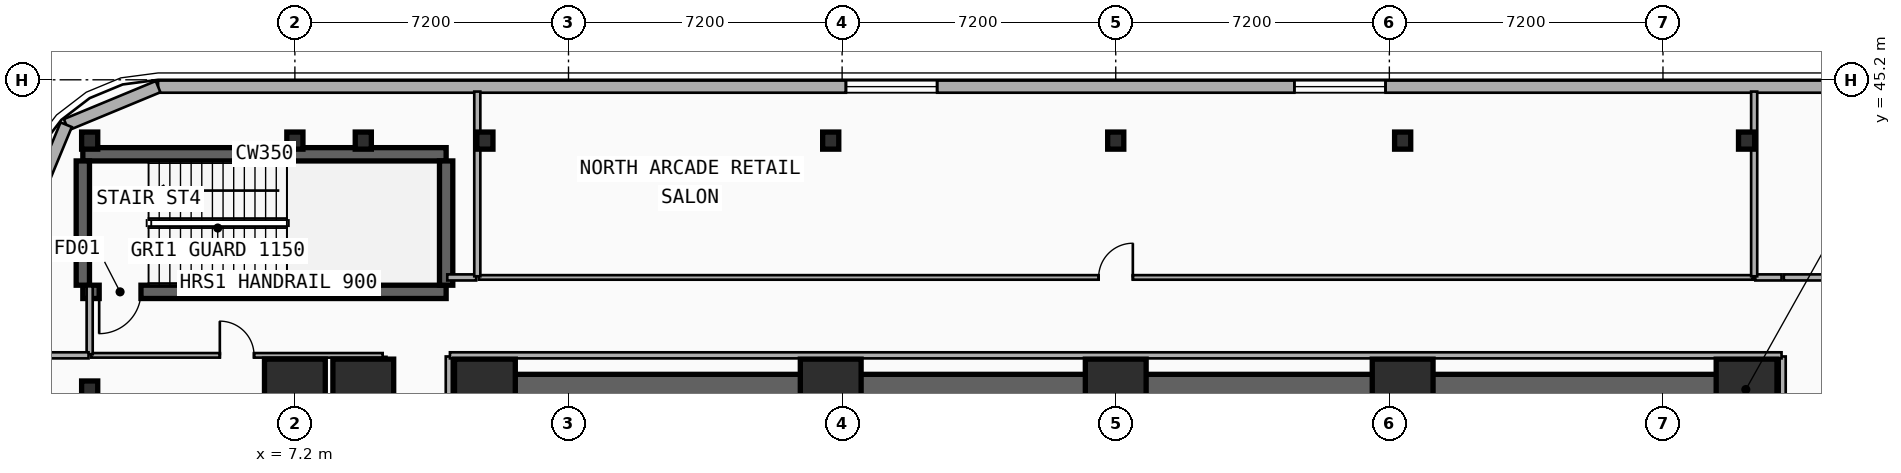
"""IFC4 building model, lengths in metres.
Left out: names, types, materials, properties, quantities, classifications, styles, units other than length and angle.
Written with IfcOpenShell. Run it as: python <this file> out.ifc"""

import sys

from ifc_helpers import new_model, si_unit, direction, frame, frame_2d, origin, origin_2d, place, context, subcontext, project, spatial, rectangle, i_section, extrude, element, fill, save


model = new_model("IFC4")
c1 = context("Model", 3, precision=1e-05, world=origin(), true_north=direction((0.0, 1.0)))
c2 = subcontext(c1, "Body", "Model", "MODEL_VIEW")
j1 = project(units=[si_unit("LENGTHUNIT", "METRE"), si_unit("PLANEANGLEUNIT", "RADIAN")], contexts=[c1])
p1 = place(None, origin())
s1 = spatial("IfcSite", under=j1, at=p1, CompositionType="ELEMENT")
p2 = place(p1, origin())
s2 = spatial("IfcBuilding", under=s1, at=p2, CompositionType="ELEMENT")
p3 = place(p2, frame((0.0, 0.0, 5.4)))
s3 = spatial("IfcBuildingStorey", under=s2, at=p3, CompositionType="ELEMENT", Elevation=5.4)
p4 = place(p3, frame((12.15, 37.05, 0.0), z_axis=(0.0, 0.0, 1.0), x_axis=(1.0, 0.0, 0.0)))
e1 = element("IfcWall", 1, at=p4, inside=s3, PredefinedType="SHEAR", context=c2, shape_type="SweptSolid", body=[
    extrude(rectangle(XDim=33.23, YDim=0.8, at=frame_2d((16.615, 0.0))), origin(), (0.0, 0.0, 1.0), 5.0),
])
p5 = place(p3, frame((1.62, 43.24, 0.0), z_axis=(0.0, 0.0, 1.0), x_axis=(1.0, 0.0, 0.0)))
e2 = element("IfcWall", 2, at=p5, inside=s3, PredefinedType="SHEAR", context=c2, shape_type="SweptSolid", body=[
    extrude(rectangle(XDim=9.56, YDim=0.35, at=frame_2d((4.78, 0.0))), origin(), (0.0, 0.0, 1.0), 5.0),
])
p6 = place(p3, frame((11.18, 39.62, 0.0), z_axis=(0.0, 0.0, 1.0), x_axis=(-1.0, 0.0, 0.0)))
e3 = element("IfcWall", 3, at=p6, inside=s3, PredefinedType="SHEAR", context=c2, shape_type="SweptSolid", body=[
    extrude(rectangle(XDim=9.56, YDim=0.35, at=frame_2d((4.78, 0.0))), origin(), (0.0, 0.0, 1.0), 5.0),
])
p7 = place(p6, frame((8.03, 0.0, 0.0)))
e4 = element("IfcOpeningElement", 4, at=p7, cuts=e3, PredefinedType="OPENING", context=c2, shape_type="SweptSolid", body=[
    extrude(rectangle(XDim=1.1, YDim=2.15, at=frame_2d((0.55, 1.075))), frame((0.0, 0.185, 0.0), z_axis=(0.0, -1.0, 0.0), x_axis=(1.0, 0.0, 0.0)), (0.0, 0.0, 1.0), 0.37),
])
for number, where, z_axis, x_axis in (
    (5, (1.62, 39.795, 0.0), (0.0, 0.0, 1.0), (0.0, 1.0, 0.0)),
    (6, (11.18, 39.795, 0.0), (0.0, 0.0, 1.0), (0.0, 1.0, 0.0)),
):
    element("IfcWall", number, at=place(p3, frame(where, z_axis=z_axis, x_axis=x_axis)), inside=s3, PredefinedType="SHEAR", context=c2, shape_type="SweptSolid", body=[
        extrude(rectangle(XDim=3.27, YDim=0.35, at=frame_2d((1.635, 0.0))), origin(), (0.0, 0.0, 1.0), 5.0),
    ])
for number, where, z_axis, x_axis in (
    (7, (12.2, 37.05, 0.0), (0.0, 0.0, 1.0), (1.0, 0.0, 0.0)),
    (8, (21.3, 37.05, 0.0), (0.0, 0.0, 1.0), (1.0, 0.0, 0.0)),
    (9, (28.8, 37.05, 0.0), (0.0, 0.0, 1.0), (1.0, 0.0, 0.0)),
    (10, (36.35, 37.05, 0.0), (0.0, 0.0, 1.0), (1.0, 0.0, 0.0)),
    (11, (45.4, 37.05, 0.0), (0.0, 0.0, 1.0), (1.0, 0.0, 0.0)),
):
    element("IfcColumn", number, at=place(p3, frame(where, z_axis=z_axis, x_axis=x_axis)), inside=s3, PredefinedType="COLUMN", context=c2, shape_type="SweptSolid", body=[
        extrude(rectangle(XDim=1.6, YDim=1.6, at=origin_2d()), origin(), (0.0, 0.0, 1.0), 5.0),
    ])
for number, where, z_axis, x_axis in (
    (12, (1.8, 37.05, 0.0), (0.0, 0.0, 1.0), (1.0, 0.0, 0.0)),
    (13, (1.8, 43.6, 0.0), (0.0, 0.0, 1.0), (1.0, 0.0, 0.0)),
):
    element("IfcColumn", number, at=place(p3, frame(where, z_axis=z_axis, x_axis=x_axis)), inside=s3, PredefinedType="COLUMN", context=c2, shape_type="SweptSolid", body=[
        extrude(i_section(OverallWidth=0.424, OverallDepth=0.45, WebThickness=0.041, FlangeThickness=0.065, FilletRadius=0.015, at=origin_2d()), origin(), (0.0, 0.0, 1.0), 5.0),
    ])
p8 = place(p3, frame((7.2, 37.05, 0.0), z_axis=(0.0, 0.0, 1.0), x_axis=(1.0, 0.0, 0.0)))
e14 = element("IfcColumn", 14, at=p8, inside=s3, PredefinedType="COLUMN", context=c2, shape_type="SweptSolid", body=[
    extrude(rectangle(XDim=1.6, YDim=1.6, at=origin_2d()), origin(), (0.0, 0.0, 1.0), 5.0),
])
p9 = place(p3, frame((7.2, 43.6, 0.0), z_axis=(0.0, 0.0, 1.0), x_axis=(1.0, 0.0, 0.0)))
e15 = element("IfcColumn", 15, at=p9, inside=s3, PredefinedType="COLUMN", context=c2, shape_type="SweptSolid", body=[
    extrude(i_section(OverallWidth=0.424, OverallDepth=0.45, WebThickness=0.041, FlangeThickness=0.065, FilletRadius=0.015, at=origin_2d()), origin(), (0.0, 0.0, 1.0), 5.0),
])
p10 = place(p3, frame((9.0, 37.05, 0.0), z_axis=(0.0, 0.0, 1.0), x_axis=(1.0, 0.0, 0.0)))
e16 = element("IfcColumn", 16, at=p10, inside=s3, PredefinedType="COLUMN", context=c2, shape_type="SweptSolid", body=[
    extrude(rectangle(XDim=1.6, YDim=1.6, at=origin_2d()), origin(), (0.0, 0.0, 1.0), 5.0),
])
for number, where, z_axis, x_axis in (
    (17, (9.0, 43.6, 0.0), (0.0, 0.0, 1.0), (1.0, 0.0, 0.0)),
    (18, (12.2, 43.6, 0.0), (0.0, 0.0, 1.0), (1.0, 0.0, 0.0)),
    (19, (21.3, 43.6, 0.0), (0.0, 0.0, 1.0), (1.0, 0.0, 0.0)),
    (20, (28.8, 43.6, 0.0), (0.0, 0.0, 1.0), (1.0, 0.0, 0.0)),
    (21, (36.35, 43.6, 0.0), (0.0, 0.0, 1.0), (1.0, 0.0, 0.0)),
    (22, (45.4, 43.6, 0.0), (0.0, 0.0, 1.0), (1.0, 0.0, 0.0)),
):
    element("IfcColumn", number, at=place(p3, frame(where, z_axis=z_axis, x_axis=x_axis)), inside=s3, PredefinedType="COLUMN", context=c2, shape_type="SweptSolid", body=[
        extrude(i_section(OverallWidth=0.424, OverallDepth=0.45, WebThickness=0.041, FlangeThickness=0.065, FilletRadius=0.015, at=origin_2d()), origin(), (0.0, 0.0, 1.0), 5.0),
    ])
p11 = place(p3, frame((3.6, 45.02, 0.0), z_axis=(0.0, 0.0, 1.0), x_axis=(1.0, 0.0, 0.0)))
e23 = element("IfcWall", 23, at=p11, inside=s3, PredefinedType="SOLIDWALL", context=c2, shape_type="SweptSolid", body=[
    extrude(rectangle(XDim=50.4, YDim=0.32, at=frame_2d((25.2, 0.0))), origin(), (0.0, 0.0, 1.0), 4.7),
])
p12 = place(p11, frame((18.1, 0.0, 0.9)))
e24 = element("IfcOpeningElement", 24, at=p12, cuts=e23, PredefinedType="OPENING", context=c2, shape_type="SweptSolid", body=[
    extrude(rectangle(XDim=2.4, YDim=1.8, at=frame_2d((1.2, 0.9))), frame((0.0, 0.17, 0.0), z_axis=(0.0, -1.0, 0.0), x_axis=(1.0, 0.0, 0.0)), (0.0, 0.0, 1.0), 0.34),
])
p13 = place(p11, frame((29.9, 0.0, 0.9)))
e25 = element("IfcOpeningElement", 25, at=p13, cuts=e23, PredefinedType="OPENING", context=c2, shape_type="SweptSolid", body=[
    extrude(rectangle(XDim=2.4, YDim=1.8, at=frame_2d((1.2, 0.9))), frame((0.0, 0.17, 0.0), z_axis=(0.0, -1.0, 0.0), x_axis=(1.0, 0.0, 0.0)), (0.0, 0.0, 1.0), 0.34),
])
p14 = place(p3, frame((1.182, 44.018, 0.0), z_axis=(0.0, 0.0, 1.0), x_axis=(0.923886112352, 0.382667546838, 0.0)))
e26 = element("IfcWall", 26, at=p14, inside=s3, PredefinedType="SOLIDWALL", context=c2, shape_type="SweptSolid", body=[
    extrude(rectangle(XDim=2.618, YDim=0.32, at=frame_2d((1.309, 0.0))), origin(), (0.0, 0.0, 1.0), 4.7),
])
p15 = place(p3, frame((0.18, 41.6, 0.0), z_axis=(0.0, 0.0, 1.0), x_axis=(0.382700522567, 0.923872453333, 0.0)))
e27 = element("IfcWall", 27, at=p15, inside=s3, PredefinedType="SOLIDWALL", context=c2, shape_type="SweptSolid", body=[
    extrude(rectangle(XDim=2.617, YDim=0.32, at=frame_2d((1.309, 0.0))), origin(), (0.0, 0.0, 1.0), 4.7),
])
p16 = place(p3, frame((9.55, 27.64, 0.0), z_axis=(0.0, 0.0, 1.0), x_axis=(0.0, 1.0, 0.0)))
e28 = element("IfcWall", 28, at=p16, inside=s3, PredefinedType="PARTITIONING", context=c2, shape_type="SweptSolid", body=[
    extrude(rectangle(XDim=10.27, YDim=0.12, at=frame_2d((5.135, 0.0))), origin(), (0.0, 0.0, 1.0), 4.7),
])
p17 = place(p16, frame((4.685, 0.0, 0.0)))
e29 = element("IfcOpeningElement", 29, at=p17, cuts=e28, PredefinedType="OPENING", context=c2, shape_type="SweptSolid", body=[
    extrude(rectangle(XDim=0.9, YDim=2.1, at=frame_2d((0.45, 1.05))), frame((0.0, 0.07, 0.0), z_axis=(0.0, -1.0, 0.0), x_axis=(1.0, 0.0, 0.0)), (0.0, 0.0, 1.0), 0.14),
])
p18 = place(p3, frame((1.84, 37.95, 0.0), z_axis=(0.0, 0.0, 1.0), x_axis=(1.0, 0.0, 0.0)))
e30 = element("IfcWall", 30, at=p18, inside=s3, PredefinedType="PARTITIONING", context=c2, shape_type="SweptSolid", body=[
    extrude(rectangle(XDim=7.67, YDim=0.12, at=frame_2d((3.835, 0.0))), origin(), (0.0, 0.0, 1.0), 4.7),
])
p19 = place(p18, frame((3.385, 0.0, 0.0)))
e31 = element("IfcOpeningElement", 31, at=p19, cuts=e30, PredefinedType="OPENING", context=c2, shape_type="SweptSolid", body=[
    extrude(rectangle(XDim=0.9, YDim=2.1, at=frame_2d((0.45, 1.05))), frame((0.0, 0.07, 0.0), z_axis=(0.0, -1.0, 0.0), x_axis=(1.0, 0.0, 0.0)), (0.0, 0.0, 1.0), 0.14),
])
p20 = place(p3, frame((12.04, 40.0, 0.0), z_axis=(0.0, 0.0, 1.0), x_axis=(1.0, 0.0, 0.0)))
e32 = element("IfcWall", 32, at=p20, inside=s3, PredefinedType="PARTITIONING", context=c2, shape_type="SweptSolid", body=[
    extrude(rectangle(XDim=33.52, YDim=0.12, at=frame_2d((16.76, 0.0))), origin(), (0.0, 0.0, 1.0), 4.03),
])
p21 = place(p20, frame((16.31, 0.0, 0.0)))
e33 = element("IfcOpeningElement", 33, at=p21, cuts=e32, PredefinedType="OPENING", context=c2, shape_type="SweptSolid", body=[
    extrude(rectangle(XDim=0.9, YDim=2.1, at=frame_2d((0.45, 1.05))), frame((0.0, 0.07, 0.0), z_axis=(0.0, -1.0, 0.0), x_axis=(1.0, 0.0, 0.0)), (0.0, 0.0, 1.0), 0.14),
])
p22 = place(p3, frame((11.25, 27.63, 0.0), z_axis=(0.0, 0.0, 1.0), x_axis=(0.0, 1.0, 0.0)))
e34 = element("IfcWall", 34, at=p22, inside=s3, PredefinedType="PARTITIONING", context=c2, shape_type="SweptSolid", body=[
    extrude(rectangle(XDim=10.29, YDim=0.16, at=frame_2d((5.145, 0.0))), origin(), (0.0, 0.0, 1.0), 4.7),
])
p23 = place(p3, frame((46.38, 40.0, 0.0), z_axis=(0.0, 0.0, 1.0), x_axis=(1.0, 0.0, 0.0)))
e35 = element("IfcWall", 35, at=p23, inside=s3, PredefinedType="PARTITIONING", context=c2, shape_type="SweptSolid", body=[
    extrude(rectangle(XDim=1.64, YDim=0.16, at=frame_2d((0.82, 0.0))), origin(), (0.0, 0.0, 1.0), 4.7),
])
p24 = place(p3, frame((46.35, 27.63, 0.0), z_axis=(0.0, 0.0, 1.0), x_axis=(0.0, 1.0, 0.0)))
e36 = element("IfcWall", 36, at=p24, inside=s3, PredefinedType="PARTITIONING", context=c2, shape_type="SweptSolid", body=[
    extrude(rectangle(XDim=10.29, YDim=0.16, at=frame_2d((5.145, 0.0))), origin(), (0.0, 0.0, 1.0), 4.7),
])
p25 = place(p3, frame((11.28, 37.95, 0.0), z_axis=(0.0, 0.0, 1.0), x_axis=(1.0, 0.0, 0.0)))
e37 = element("IfcWall", 37, at=p25, inside=s3, PredefinedType="PARTITIONING", context=c2, shape_type="SweptSolid", body=[
    extrude(rectangle(XDim=35.04, YDim=0.16, at=frame_2d((17.52, 0.0))), origin(), (0.0, 0.0, 1.0), 4.03),
])
p26 = place(p3, frame((11.21, 40.0, 0.0), z_axis=(0.0, 0.0, 1.0), x_axis=(1.0, 0.0, 0.0)))
e38 = element("IfcWall", 38, at=p26, inside=s3, PredefinedType="PARTITIONING", context=c2, shape_type="SweptSolid", body=[
    extrude(rectangle(XDim=0.76, YDim=0.16, at=frame_2d((0.38, 0.0))), origin(), (0.0, 0.0, 1.0), 4.03),
])
p27 = place(p3, frame((45.63, 40.0, 0.0), z_axis=(0.0, 0.0, 1.0), x_axis=(1.0, 0.0, 0.0)))
e39 = element("IfcWall", 39, at=p27, inside=s3, PredefinedType="PARTITIONING", context=c2, shape_type="SweptSolid", body=[
    extrude(rectangle(XDim=0.69, YDim=0.16, at=frame_2d((0.345, 0.0))), origin(), (0.0, 0.0, 1.0), 4.03),
])
p28 = place(p3, frame((1.8, 37.98, 0.0), z_axis=(0.0, 0.0, 1.0), x_axis=(0.0, 1.0, 0.0)))
e40 = element("IfcWall", 40, at=p28, inside=s3, PredefinedType="PARTITIONING", context=c2, shape_type="SweptSolid", body=[
    extrude(rectangle(XDim=1.785, YDim=0.16, at=frame_2d((0.893, 0.0))), origin(), (0.0, 0.0, 1.0), 4.7),
])
p29 = place(p3, frame((0.31, 37.95, 0.0), z_axis=(0.0, 0.0, 1.0), x_axis=(1.0, 0.0, 0.0)))
e41 = element("IfcWall", 41, at=p29, inside=s3, PredefinedType="PARTITIONING", context=c2, shape_type="SweptSolid", body=[
    extrude(rectangle(XDim=1.46, YDim=0.16, at=frame_2d((0.73, 0.0))), origin(), (0.0, 0.0, 1.0), 4.7),
])
for number, where, z_axis, x_axis in (
    (42, (12.0, 40.03, 0.0), (0.0, 0.0, 1.0), (0.0, 1.0, 0.0)),
    (43, (45.6, 40.03, 0.0), (0.0, 0.0, 1.0), (0.0, 1.0, 0.0)),
):
    element("IfcWall", number, at=place(p3, frame(where, z_axis=z_axis, x_axis=x_axis)), inside=s3, PredefinedType="PARTITIONING", context=c2, shape_type="SweptSolid", body=[
        extrude(rectangle(XDim=4.86, YDim=0.16, at=frame_2d((2.43, 0.0))), origin(), (0.0, 0.0, 1.0), 4.03),
    ])
p30 = place(p12, origin())
e44 = element("IfcWindow", 44, at=p30, inside=s3, PartitioningType="SINGLE_PANEL", PredefinedType="WINDOW", context=c2, shape_type="SweptSolid", body=[
    extrude(rectangle(XDim=2.4, YDim=1.8, at=frame_2d((1.2, 0.9))), frame((0.0, 0.03, 0.0), z_axis=(0.0, -1.0, 0.0), x_axis=(1.0, 0.0, 0.0)), (0.0, 0.0, 1.0), 0.06),
])
fill(e24, e44)
p31 = place(p13, origin())
e45 = element("IfcWindow", 45, at=p31, inside=s3, PartitioningType="SINGLE_PANEL", PredefinedType="WINDOW", context=c2, shape_type="SweptSolid", body=[
    extrude(rectangle(XDim=2.4, YDim=1.8, at=frame_2d((1.2, 0.9))), frame((0.0, 0.03, 0.0), z_axis=(0.0, -1.0, 0.0), x_axis=(1.0, 0.0, 0.0)), (0.0, 0.0, 1.0), 0.06),
])
fill(e25, e45)
p32 = place(p7, origin())
e46 = element("IfcDoor", 46, at=p32, inside=s3, OperationType="SINGLE_SWING_RIGHT", PredefinedType="DOOR", context=c2, shape_type="SweptSolid", body=[
    extrude(rectangle(XDim=1.1, YDim=2.15, at=frame_2d((0.55, 1.075))), frame((0.0, 0.025, 0.0), z_axis=(0.0, -1.0, 0.0), x_axis=(1.0, 0.0, 0.0)), (0.0, 0.0, 1.0), 0.05),
])
fill(e4, e46)
p33 = place(p19, origin())
e47 = element("IfcDoor", 47, at=p33, inside=s3, OperationType="SINGLE_SWING_LEFT", PredefinedType="DOOR", context=c2, shape_type="SweptSolid", body=[
    extrude(rectangle(XDim=0.9, YDim=2.1, at=frame_2d((0.45, 1.05))), frame((0.0, 0.025, 0.0), z_axis=(0.0, -1.0, 0.0), x_axis=(1.0, 0.0, 0.0)), (0.0, 0.0, 1.0), 0.05),
])
fill(e31, e47)
p34 = place(p21, origin())
e48 = element("IfcDoor", 48, at=p34, inside=s3, OperationType="SINGLE_SWING_RIGHT", PredefinedType="DOOR", context=c2, shape_type="SweptSolid", body=[
    extrude(rectangle(XDim=0.9, YDim=2.1, at=frame_2d((0.45, 1.05))), frame((0.0, 0.025, 0.0), z_axis=(0.0, -1.0, 0.0), x_axis=(1.0, 0.0, 0.0)), (0.0, 0.0, 1.0), 0.05),
])
fill(e33, e48)
save(model, sys.argv[1])
